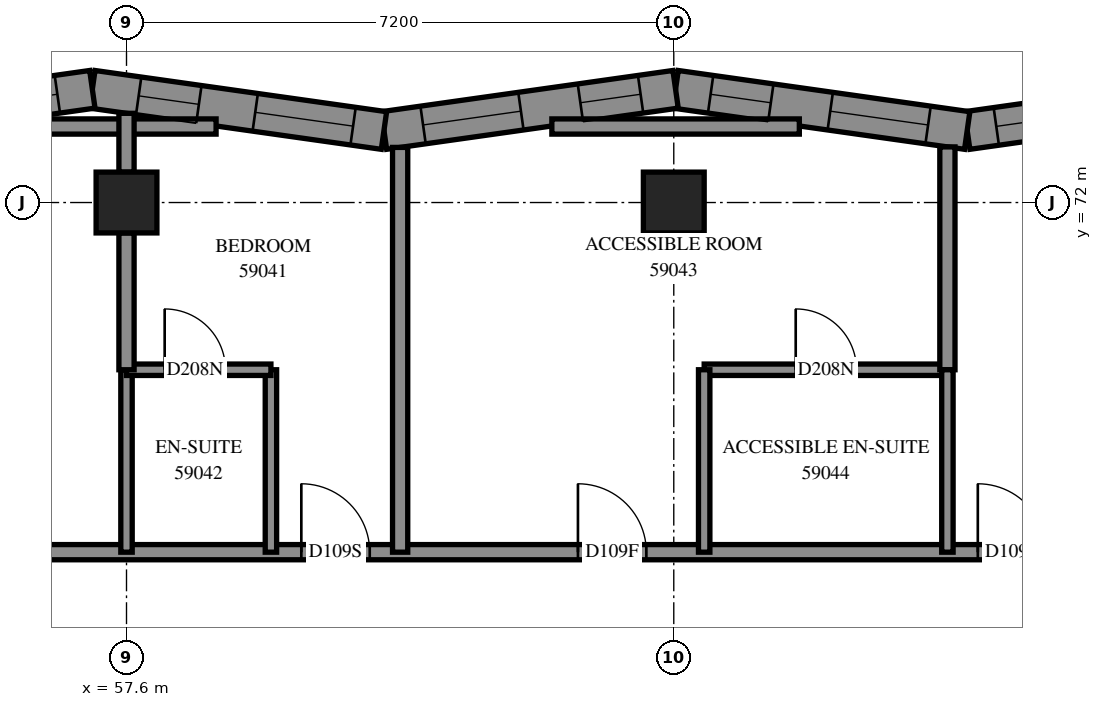
"""IFC4 building model, lengths in metres.
Left out: names, types, materials, properties, quantities, classifications, styles, units other than length and angle.
Written with IfcOpenShell. Run it as: python <this file> out.ifc"""

import sys

from ifc_helpers import new_model, si_unit, direction, frame, frame_2d, origin, origin_2d, place, context, subcontext, project, spatial, polyline, rectangle, outline, extrude, element, fill, save


model = new_model("IFC4")
c1 = context("Model", 3, precision=1e-05, world=origin(), true_north=direction((0.0, 1.0)))
c2 = subcontext(c1, "Body", "Model", "MODEL_VIEW")
j1 = project(units=[si_unit("LENGTHUNIT", "METRE"), si_unit("PLANEANGLEUNIT", "RADIAN")], contexts=[c1])
p1 = place(None, origin())
s1 = spatial("IfcSite", under=j1, at=p1, CompositionType="ELEMENT")
p2 = place(p1, origin())
s2 = spatial("IfcBuilding", under=s1, at=p2, CompositionType="ELEMENT")
p3 = place(p2, frame((0.0, 0.0, 216.8)))
s3 = spatial("IfcBuildingStorey", under=s2, at=p3, CompositionType="ELEMENT", Elevation=216.8)
for number, where, z_axis, x_axis in (
    (1, (57.6, 72.0, 0.0), (0.0, 0.0, 1.0), (1.0, 0.0, 0.0)),
    (2, (64.8, 72.0, 0.0), (0.0, 0.0, 1.0), (1.0, 0.0, 0.0)),
):
    element("IfcColumn", number, at=place(p3, frame(where, z_axis=z_axis, x_axis=x_axis)), inside=s3, PredefinedType="COLUMN", context=c2, shape_type="SweptSolid", body=[
        extrude(rectangle(XDim=0.8, YDim=0.8, at=origin_2d()), origin(), (0.0, 0.0, 1.0), 3.1),
    ])
p4 = place(p3, frame((72.497, 73.49, 0.0), z_axis=(0.0, 0.0, 1.0), x_axis=(-0.9901681853, -0.1398819675, 0.0)))
e3 = element("IfcWall", 3, at=p4, inside=s3, PredefinedType="SOLIDWALL", context=c2, shape_type="SweptSolid", body=[
    extrude(outline(polyline([(-0.035, -0.25), (3.839, -0.25), (3.91, 0.25), (0.035, 0.25), (-0.035, -0.25)])), origin(), (0.0, 0.0, 1.0), 3.1),
])
p5 = place(p4, frame((0.688, 0.0, 0.45)))
e4 = element("IfcOpeningElement", 4, at=p5, cuts=e3, PredefinedType="OPENING", context=c2, shape_type="SweptSolid", body=[
    extrude(rectangle(XDim=1.3, YDim=2.5, at=frame_2d((0.65, 1.25))), frame((0.0, 0.26, 0.0), z_axis=(0.0, -1.0, 0.0), x_axis=(1.0, 0.0, 0.0)), (0.0, 0.0, 1.0), 0.52),
])
p6 = place(p4, frame((2.188, 0.0, 0.45)))
e5 = element("IfcOpeningElement", 5, at=p6, cuts=e3, PredefinedType="OPENING", context=c2, shape_type="SweptSolid", body=[
    extrude(rectangle(XDim=1.3, YDim=2.5, at=frame_2d((0.65, 1.25))), frame((0.0, 0.26, 0.0), z_axis=(0.0, -1.0, 0.0), x_axis=(1.0, 0.0, 0.0)), (0.0, 0.0, 1.0), 0.52),
])
p7 = place(p3, frame((68.66, 72.948, 0.0), z_axis=(0.0, 0.0, 1.0), x_axis=(-0.9901681853, 0.1398819675, 0.0)))
e6 = element("IfcWall", 6, at=p7, inside=s3, PredefinedType="SOLIDWALL", context=c2, shape_type="SweptSolid", body=[
    extrude(outline(polyline([(0.035, -0.25), (3.91, -0.25), (3.839, 0.25), (-0.035, 0.25), (0.035, -0.25)])), origin(), (0.0, 0.0, 1.0), 3.1),
])
p8 = place(p7, frame((0.52, 0.0, 0.45)))
e7 = element("IfcOpeningElement", 7, at=p8, cuts=e6, PredefinedType="OPENING", context=c2, shape_type="SweptSolid", body=[
    extrude(rectangle(XDim=1.3, YDim=2.5, at=frame_2d((0.65, 1.25))), frame((0.0, 0.26, 0.0), z_axis=(0.0, -1.0, 0.0), x_axis=(1.0, 0.0, 0.0)), (0.0, 0.0, 1.0), 0.52),
])
p9 = place(p7, frame((2.609, 0.0, 0.45)))
e8 = element("IfcOpeningElement", 8, at=p9, cuts=e6, PredefinedType="OPENING", context=c2, shape_type="SweptSolid", body=[
    extrude(rectangle(XDim=0.8, YDim=2.5, at=frame_2d((0.4, 1.25))), frame((0.0, 0.26, 0.0), z_axis=(0.0, -1.0, 0.0), x_axis=(1.0, 0.0, 0.0)), (0.0, 0.0, 1.0), 0.52),
])
p10 = place(p3, frame((64.824, 73.49, 0.0), z_axis=(0.0, 0.0, 1.0), x_axis=(-0.9901681853, -0.1398819675, 0.0)))
e9 = element("IfcWall", 9, at=p10, inside=s3, PredefinedType="SOLIDWALL", context=c2, shape_type="SweptSolid", body=[
    extrude(outline(polyline([(-0.035, -0.25), (3.839, -0.25), (3.91, 0.25), (0.035, 0.25), (-0.035, -0.25)])), origin(), (0.0, 0.0, 1.0), 3.1),
])
p11 = place(p10, frame((2.055, 0.0, 0.45)))
e10 = element("IfcOpeningElement", 10, at=p11, cuts=e9, PredefinedType="OPENING", context=c2, shape_type="SweptSolid", body=[
    extrude(rectangle(XDim=1.3, YDim=2.5, at=frame_2d((0.65, 1.25))), frame((0.0, 0.26, 0.0), z_axis=(0.0, -1.0, 0.0), x_axis=(1.0, 0.0, 0.0)), (0.0, 0.0, 1.0), 0.52),
])
p12 = place(p10, frame((0.465, 0.0, 0.45)))
e11 = element("IfcOpeningElement", 11, at=p12, cuts=e9, PredefinedType="OPENING", context=c2, shape_type="SweptSolid", body=[
    extrude(rectangle(XDim=0.8, YDim=2.5, at=frame_2d((0.4, 1.25))), frame((0.0, 0.26, 0.0), z_axis=(0.0, -1.0, 0.0), x_axis=(1.0, 0.0, 0.0)), (0.0, 0.0, 1.0), 0.52),
])
p13 = place(p3, frame((60.987, 72.948, 0.0), z_axis=(0.0, 0.0, 1.0), x_axis=(-0.9901681853, 0.1398819675, 0.0)))
e12 = element("IfcWall", 12, at=p13, inside=s3, PredefinedType="SOLIDWALL", context=c2, shape_type="SweptSolid", body=[
    extrude(outline(polyline([(0.035, -0.25), (3.91, -0.25), (3.839, 0.25), (-0.035, 0.25), (0.035, -0.25)])), origin(), (0.0, 0.0, 1.0), 3.1),
])
p14 = place(p13, frame((0.41, 0.0, 0.45)))
e13 = element("IfcOpeningElement", 13, at=p14, cuts=e12, PredefinedType="OPENING", context=c2, shape_type="SweptSolid", body=[
    extrude(rectangle(XDim=1.3, YDim=2.5, at=frame_2d((0.65, 1.25))), frame((0.0, 0.26, 0.0), z_axis=(0.0, -1.0, 0.0), x_axis=(1.0, 0.0, 0.0)), (0.0, 0.0, 1.0), 0.52),
])
p15 = place(p13, frame((2.459, 0.0, 0.45)))
e14 = element("IfcOpeningElement", 14, at=p15, cuts=e12, PredefinedType="OPENING", context=c2, shape_type="SweptSolid", body=[
    extrude(rectangle(XDim=0.8, YDim=2.5, at=frame_2d((0.4, 1.25))), frame((0.0, 0.26, 0.0), z_axis=(0.0, -1.0, 0.0), x_axis=(1.0, 0.0, 0.0)), (0.0, 0.0, 1.0), 0.52),
])
p16 = place(p3, frame((57.151, 73.49, 0.0), z_axis=(0.0, 0.0, 1.0), x_axis=(-0.9901676803, -0.1398855422, 0.0)))
e15 = element("IfcWall", 15, at=p16, inside=s3, PredefinedType="SOLIDWALL", context=c2, shape_type="SweptSolid", body=[
    extrude(outline(polyline([(-0.035, -0.25), (3.839, -0.25), (3.91, 0.25), (0.035, 0.25), (-0.035, -0.25)])), origin(), (0.0, 0.0, 1.0), 3.1),
])
p17 = place(p16, frame((0.465, 0.0, 0.45)))
e16 = element("IfcOpeningElement", 16, at=p17, cuts=e15, PredefinedType="OPENING", context=c2, shape_type="SweptSolid", body=[
    extrude(rectangle(XDim=0.8, YDim=2.5, at=frame_2d((0.4, 1.25))), frame((0.0, 0.26, 0.0), z_axis=(0.0, -1.0, 0.0), x_axis=(1.0, 0.0, 0.0)), (0.0, 0.0, 1.0), 0.52),
])
p18 = place(p16, frame((1.902, 0.0, 0.5)))
e17 = element("IfcOpeningElement", 17, at=p18, cuts=e15, PredefinedType="OPENING", context=c2, shape_type="SweptSolid", body=[
    extrude(rectangle(XDim=1.2, YDim=2.45, at=frame_2d((0.6, 1.225))), frame((0.0, 0.26, 0.0), z_axis=(0.0, -1.0, 0.0), x_axis=(1.0, 0.0, 0.0)), (0.0, 0.0, 1.0), 0.52),
])
p19 = place(p3, frame((55.0, 67.4, 0.0), z_axis=(0.0, 0.0, 1.0), x_axis=(1.0, 0.0, 0.0)))
e18 = element("IfcWall", 18, at=p19, inside=s3, PredefinedType="PARTITIONING", context=c2, shape_type="SweptSolid", body=[
    extrude(rectangle(XDim=19.6, YDim=0.2, at=frame_2d((9.8, 0.0))), origin(), (0.0, 0.0, 1.0), 3.1),
])
p20 = place(p19, frame((4.9, 0.0, 0.0)))
e19 = element("IfcOpeningElement", 19, at=p20, cuts=e18, PredefinedType="OPENING", context=c2, shape_type="SweptSolid", body=[
    extrude(rectangle(XDim=0.9, YDim=2.1, at=frame_2d((0.45, 1.05))), frame((0.0, 0.11, 0.0), z_axis=(0.0, -1.0, 0.0), x_axis=(1.0, 0.0, 0.0)), (0.0, 0.0, 1.0), 0.22),
])
p21 = place(p19, frame((8.539, 0.0, 0.0)))
e20 = element("IfcOpeningElement", 20, at=p21, cuts=e18, PredefinedType="OPENING", context=c2, shape_type="SweptSolid", body=[
    extrude(rectangle(XDim=0.9, YDim=2.1, at=frame_2d((0.45, 1.05))), frame((0.0, 0.11, 0.0), z_axis=(0.0, -1.0, 0.0), x_axis=(1.0, 0.0, 0.0)), (0.0, 0.0, 1.0), 0.22),
])
p22 = place(p19, frame((13.8, 0.0, 0.0)))
e21 = element("IfcOpeningElement", 21, at=p22, cuts=e18, PredefinedType="OPENING", context=c2, shape_type="SweptSolid", body=[
    extrude(rectangle(XDim=0.9, YDim=2.1, at=frame_2d((0.45, 1.05))), frame((0.0, 0.11, 0.0), z_axis=(0.0, -1.0, 0.0), x_axis=(1.0, 0.0, 0.0)), (0.0, 0.0, 1.0), 0.22),
])
p23 = place(p3, frame((61.2, 67.4, 0.0), z_axis=(0.0, 0.0, 1.0), x_axis=(0.0, 1.0, 0.0)))
e22 = element("IfcWall", 22, at=p23, inside=s3, PredefinedType="PARTITIONING", context=c2, shape_type="SweptSolid", body=[
    extrude(rectangle(XDim=5.325, YDim=0.2, at=frame_2d((2.663, 0.0))), origin(), (0.0, 0.0, 1.0), 3.1),
])
p24 = place(p3, frame((55.523, 73.0, 0.0), z_axis=(0.0, 0.0, 1.0), x_axis=(1.0, 0.0, 0.0)))
e23 = element("IfcWall", 23, at=p24, inside=s3, PredefinedType="PARTITIONING", context=c2, shape_type="SweptSolid", body=[
    extrude(rectangle(XDim=3.256, YDim=0.2, at=frame_2d((1.628, 0.0))), origin(), (0.0, 0.0, 1.0), 3.1),
])
p25 = place(p3, frame((63.196, 73.0, 0.0), z_axis=(0.0, 0.0, 1.0), x_axis=(1.0, 0.0, 0.0)))
e24 = element("IfcWall", 24, at=p25, inside=s3, PredefinedType="PARTITIONING", context=c2, shape_type="SweptSolid", body=[
    extrude(rectangle(XDim=3.256, YDim=0.2, at=frame_2d((1.628, 0.0))), origin(), (0.0, 0.0, 1.0), 3.1),
])
p26 = place(p3, frame((65.2, 69.8, 0.0), z_axis=(0.0, 0.0, 1.0), x_axis=(1.0, 0.0, 0.0)))
e25 = element("IfcWall", 25, at=p26, inside=s3, PredefinedType="PARTITIONING", context=c2, shape_type="SweptSolid", body=[
    extrude(rectangle(XDim=3.2, YDim=0.15, at=frame_2d((1.6, 0.0))), origin(), (0.0, 0.0, 1.0), 3.1),
])
p27 = place(p26, frame((1.204, 0.0, 0.0)))
e26 = element("IfcOpeningElement", 26, at=p27, cuts=e25, PredefinedType="OPENING", context=c2, shape_type="SweptSolid", body=[
    extrude(rectangle(XDim=0.8, YDim=2.1, at=frame_2d((0.4, 1.05))), frame((0.0, 0.085, 0.0), z_axis=(0.0, -1.0, 0.0), x_axis=(1.0, 0.0, 0.0)), (0.0, 0.0, 1.0), 0.17),
])
p28 = place(p3, frame((68.4, 69.8, 0.0), z_axis=(0.0, 0.0, 1.0), x_axis=(0.0, 1.0, 0.0)))
e27 = element("IfcWall", 27, at=p28, inside=s3, PredefinedType="PARTITIONING", context=c2, shape_type="SweptSolid", body=[
    extrude(rectangle(XDim=2.932, YDim=0.2, at=frame_2d((1.466, 0.0))), origin(), (0.0, 0.0, 1.0), 3.1),
])
for number, where, z_axis, x_axis in (
    (28, (59.5, 67.4, 0.0), (0.0, 0.0, 1.0), (0.0, 1.0, 0.0)),
    (29, (57.6, 67.4, 0.0), (0.0, 0.0, 1.0), (0.0, 1.0, 0.0)),
    (30, (65.2, 67.4, 0.0), (0.0, 0.0, 1.0), (0.0, 1.0, 0.0)),
    (31, (68.4, 67.4, 0.0), (0.0, 0.0, 1.0), (0.0, 1.0, 0.0)),
):
    element("IfcWall", number, at=place(p3, frame(where, z_axis=z_axis, x_axis=x_axis)), inside=s3, PredefinedType="PARTITIONING", context=c2, shape_type="SweptSolid", body=[
        extrude(rectangle(XDim=2.4, YDim=0.15, at=frame_2d((1.2, 0.0))), origin(), (0.0, 0.0, 1.0), 3.1),
    ])
p29 = place(p3, frame((57.6, 69.8, 0.0), z_axis=(0.0, 0.0, 1.0), x_axis=(1.0, 0.0, 0.0)))
e32 = element("IfcWall", 32, at=p29, inside=s3, PredefinedType="PARTITIONING", context=c2, shape_type="SweptSolid", body=[
    extrude(rectangle(XDim=1.9, YDim=0.15, at=frame_2d((0.95, 0.0))), origin(), (0.0, 0.0, 1.0), 3.1),
])
p30 = place(p29, frame((0.502, 0.0, 0.0)))
e33 = element("IfcOpeningElement", 33, at=p30, cuts=e32, PredefinedType="OPENING", context=c2, shape_type="SweptSolid", body=[
    extrude(rectangle(XDim=0.8, YDim=2.1, at=frame_2d((0.4, 1.05))), frame((0.0, 0.085, 0.0), z_axis=(0.0, -1.0, 0.0), x_axis=(1.0, 0.0, 0.0)), (0.0, 0.0, 1.0), 0.17),
])
p31 = place(p3, frame((57.6, 69.8, 0.0), z_axis=(0.0, 0.0, 1.0), x_axis=(0.0, 1.0, 0.0)))
e34 = element("IfcWall", 34, at=p31, inside=s3, PredefinedType="PARTITIONING", context=c2, shape_type="SweptSolid", body=[
    extrude(rectangle(XDim=1.8, YDim=0.2, at=frame_2d((0.9, 0.0))), origin(), (0.0, 0.0, 1.0), 3.1),
])
p32 = place(p3, frame((57.6, 72.4, 0.0), z_axis=(0.0, 0.0, 1.0), x_axis=(0.0, 1.0, 0.0)))
e35 = element("IfcWall", 35, at=p32, inside=s3, PredefinedType="PARTITIONING", context=c2, shape_type="SweptSolid", body=[
    extrude(rectangle(XDim=0.774, YDim=0.2, at=frame_2d((0.387, 0.0))), origin(), (0.0, 0.0, 1.0), 3.1),
])
p33 = place(p6, origin())
e36 = element("IfcWindow", 36, at=p33, inside=s3, PartitioningType="SINGLE_PANEL", PredefinedType="WINDOW", context=c2, shape_type="SweptSolid", body=[
    extrude(rectangle(XDim=1.3, YDim=2.5, at=frame_2d((0.65, 1.25))), frame((0.0, 0.18, 0.0), z_axis=(0.0, -1.0, 0.0), x_axis=(1.0, 0.0, 0.0)), (0.0, 0.0, 1.0), 0.06),
])
fill(e5, e36)
p34 = place(p8, origin())
e37 = element("IfcWindow", 37, at=p34, inside=s3, PartitioningType="SINGLE_PANEL", PredefinedType="WINDOW", context=c2, shape_type="SweptSolid", body=[
    extrude(rectangle(XDim=1.3, YDim=2.5, at=frame_2d((0.65, 1.25))), frame((0.0, 0.18, 0.0), z_axis=(0.0, -1.0, 0.0), x_axis=(1.0, 0.0, 0.0)), (0.0, 0.0, 1.0), 0.06),
])
fill(e7, e37)
p35 = place(p11, origin())
e38 = element("IfcWindow", 38, at=p35, inside=s3, PartitioningType="SINGLE_PANEL", PredefinedType="WINDOW", context=c2, shape_type="SweptSolid", body=[
    extrude(rectangle(XDim=1.3, YDim=2.5, at=frame_2d((0.65, 1.25))), frame((0.0, 0.18, 0.0), z_axis=(0.0, -1.0, 0.0), x_axis=(1.0, 0.0, 0.0)), (0.0, 0.0, 1.0), 0.06),
])
fill(e10, e38)
p36 = place(p14, origin())
e39 = element("IfcWindow", 39, at=p36, inside=s3, PartitioningType="SINGLE_PANEL", PredefinedType="WINDOW", context=c2, shape_type="SweptSolid", body=[
    extrude(rectangle(XDim=1.3, YDim=2.5, at=frame_2d((0.65, 1.25))), frame((0.0, 0.18, 0.0), z_axis=(0.0, -1.0, 0.0), x_axis=(1.0, 0.0, 0.0)), (0.0, 0.0, 1.0), 0.06),
])
fill(e13, e39)
p37 = place(p20, origin())
e40 = element("IfcDoor", 40, at=p37, inside=s3, OperationType="SINGLE_SWING_RIGHT", PredefinedType="DOOR", context=c2, shape_type="SweptSolid", body=[
    extrude(rectangle(XDim=0.9, YDim=2.1, at=frame_2d((0.45, 1.05))), frame((0.0, 0.025, 0.0), z_axis=(0.0, -1.0, 0.0), x_axis=(1.0, 0.0, 0.0)), (0.0, 0.0, 1.0), 0.05),
])
fill(e19, e40)
p38 = place(p30, origin())
e41 = element("IfcDoor", 41, at=p38, inside=s3, OperationType="SINGLE_SWING_RIGHT", PredefinedType="DOOR", context=c2, shape_type="SweptSolid", body=[
    extrude(rectangle(XDim=0.8, YDim=2.1, at=frame_2d((0.4, 1.05))), frame((0.0, 0.025, 0.0), z_axis=(0.0, -1.0, 0.0), x_axis=(1.0, 0.0, 0.0)), (0.0, 0.0, 1.0), 0.05),
])
fill(e33, e41)
p39 = place(p21, origin())
e42 = element("IfcDoor", 42, at=p39, inside=s3, OperationType="SINGLE_SWING_LEFT", PredefinedType="DOOR", context=c2, shape_type="SweptSolid", body=[
    extrude(rectangle(XDim=0.9, YDim=2.1, at=frame_2d((0.45, 1.05))), frame((0.0, 0.025, 0.0), z_axis=(0.0, -1.0, 0.0), x_axis=(1.0, 0.0, 0.0)), (0.0, 0.0, 1.0), 0.05),
])
fill(e20, e42)
p40 = place(p27, origin())
e43 = element("IfcDoor", 43, at=p40, inside=s3, OperationType="SINGLE_SWING_RIGHT", PredefinedType="DOOR", context=c2, shape_type="SweptSolid", body=[
    extrude(rectangle(XDim=0.8, YDim=2.1, at=frame_2d((0.4, 1.05))), frame((0.0, 0.025, 0.0), z_axis=(0.0, -1.0, 0.0), x_axis=(1.0, 0.0, 0.0)), (0.0, 0.0, 1.0), 0.05),
])
fill(e26, e43)
p41 = place(p22, origin())
e44 = element("IfcDoor", 44, at=p41, inside=s3, OperationType="SINGLE_SWING_LEFT", PredefinedType="DOOR", context=c2, shape_type="SweptSolid", body=[
    extrude(rectangle(XDim=0.9, YDim=2.1, at=frame_2d((0.45, 1.05))), frame((0.0, 0.025, 0.0), z_axis=(0.0, -1.0, 0.0), x_axis=(1.0, 0.0, 0.0)), (0.0, 0.0, 1.0), 0.05),
])
fill(e21, e44)
p42 = place(p9, origin())
e45 = element("IfcWindow", 45, at=p42, inside=s3, PartitioningType="SINGLE_PANEL", PredefinedType="WINDOW", context=c2, shape_type="SweptSolid", body=[
    extrude(rectangle(XDim=0.8, YDim=2.5, at=frame_2d((0.4, 1.25))), frame((0.0, 0.18, 0.0), z_axis=(0.0, -1.0, 0.0), x_axis=(1.0, 0.0, 0.0)), (0.0, 0.0, 1.0), 0.06),
])
fill(e8, e45)
p43 = place(p12, origin())
e46 = element("IfcWindow", 46, at=p43, inside=s3, PartitioningType="SINGLE_PANEL", PredefinedType="WINDOW", context=c2, shape_type="SweptSolid", body=[
    extrude(rectangle(XDim=0.8, YDim=2.5, at=frame_2d((0.4, 1.25))), frame((0.0, 0.18, 0.0), z_axis=(0.0, -1.0, 0.0), x_axis=(1.0, 0.0, 0.0)), (0.0, 0.0, 1.0), 0.06),
])
fill(e11, e46)
p44 = place(p17, origin())
e47 = element("IfcWindow", 47, at=p44, inside=s3, PartitioningType="SINGLE_PANEL", PredefinedType="WINDOW", context=c2, shape_type="SweptSolid", body=[
    extrude(rectangle(XDim=0.8, YDim=2.5, at=frame_2d((0.4, 1.25))), frame((0.0, 0.18, 0.0), z_axis=(0.0, -1.0, 0.0), x_axis=(1.0, 0.0, 0.0)), (0.0, 0.0, 1.0), 0.06),
])
fill(e16, e47)
p45 = place(p15, origin())
e48 = element("IfcWindow", 48, at=p45, inside=s3, PartitioningType="SINGLE_PANEL", PredefinedType="WINDOW", context=c2, shape_type="SweptSolid", body=[
    extrude(rectangle(XDim=0.8, YDim=2.5, at=frame_2d((0.4, 1.25))), frame((0.0, 0.12, 0.0), z_axis=(0.0, -1.0, 0.0), x_axis=(1.0, 0.0, 0.0)), (0.0, 0.0, 1.0), 0.06),
])
fill(e14, e48)
save(model, sys.argv[1])
